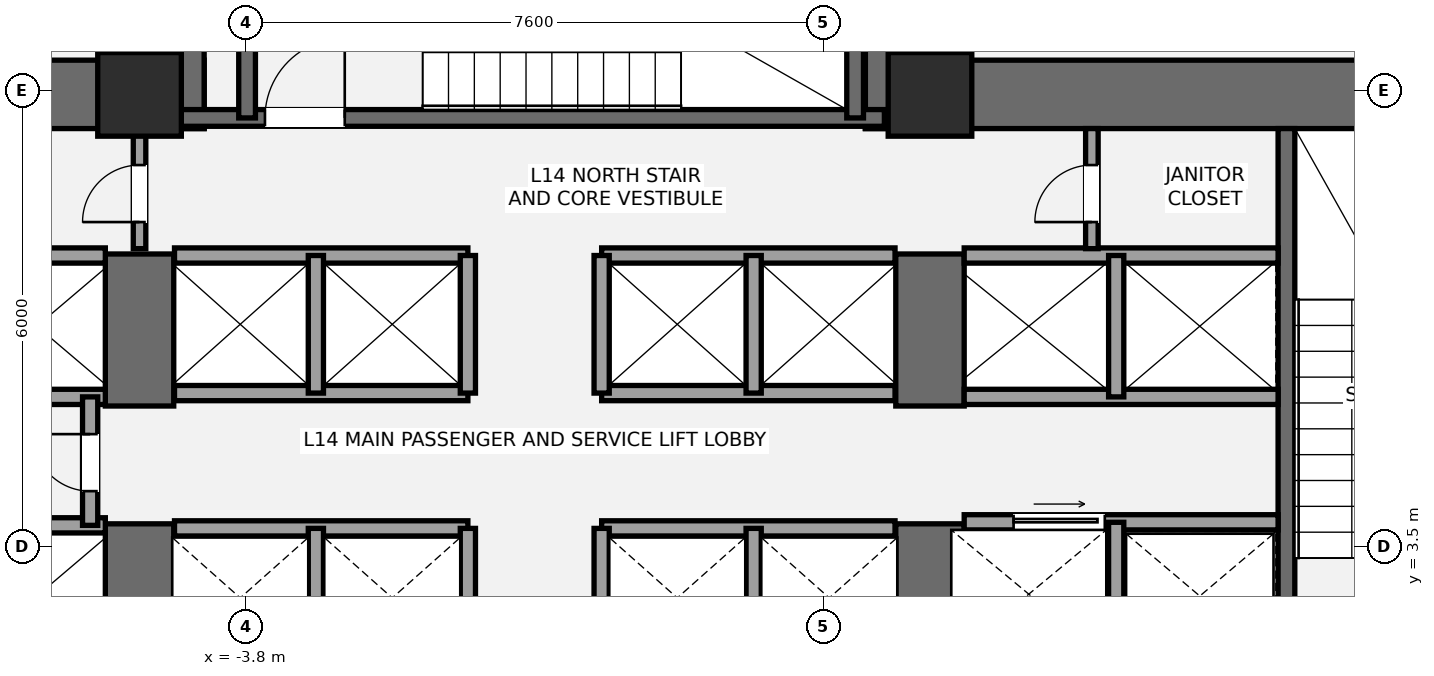
"""IFC4 building model, lengths in metres.
Left out: names, types, materials, properties, quantities, classifications, styles, units other than length and angle.
Written with IfcOpenShell. Run it as: python <this file> out.ifc"""

import sys

from ifc_helpers import new_model, si_unit, direction, frame, frame_2d, origin, origin_2d, place, context, subcontext, project, spatial, rectangle, extrude, element, fill, save


model = new_model("IFC4")
c1 = context("Model", 3, precision=1e-05, world=origin(), true_north=direction((0.0, 1.0)))
c2 = subcontext(c1, "Body", "Model", "MODEL_VIEW")
j1 = project(units=[si_unit("LENGTHUNIT", "METRE"), si_unit("PLANEANGLEUNIT", "RADIAN")], contexts=[c1])
p1 = place(None, origin())
s1 = spatial("IfcSite", under=j1, at=p1, CompositionType="ELEMENT")
p2 = place(p1, origin())
s2 = spatial("IfcBuilding", under=s1, at=p2, CompositionType="ELEMENT")
p3 = place(p2, frame((0.0, 0.0, 55.8)))
s3 = spatial("IfcBuildingStorey", under=s2, at=p3, CompositionType="ELEMENT", Elevation=55.8)
p4 = place(p3, frame((-14.05, 9.45, 0.0), z_axis=(0.0, 0.0, 1.0), x_axis=(1.0, 0.0, 0.0)))
e1 = element("IfcWall", 1, at=p4, inside=s3, PredefinedType="SHEAR", context=c2, shape_type="SweptSolid", body=[
    extrude(rectangle(XDim=9.7, YDim=0.9, at=frame_2d((4.85, 0.0))), origin(), (0.0, 0.0, 1.0), 3.6),
])
p5 = place(p3, frame((-5.2, 0.95, 0.0), z_axis=(0.0, 0.0, 1.0), x_axis=(0.0, 1.0, 0.0)))
e2 = element("IfcWall", 2, at=p5, inside=s3, PredefinedType="SHEAR", context=c2, shape_type="SweptSolid", body=[
    extrude(rectangle(XDim=2.85, YDim=0.9, at=frame_2d((1.425, 0.0))), origin(), (0.0, 0.0, 1.0), 3.6),
])
p6 = place(p3, frame((-5.2, 5.35, 0.0), z_axis=(0.0, 0.0, 1.0), x_axis=(0.0, 1.0, 0.0)))
e3 = element("IfcWall", 3, at=p6, inside=s3, PredefinedType="SHEAR", context=c2, shape_type="SweptSolid", body=[
    extrude(rectangle(XDim=2.0, YDim=0.9, at=frame_2d((1.0, 0.0))), origin(), (0.0, 0.0, 1.0), 3.6),
])
p7 = place(p3, frame((4.35, 9.45, 0.0), z_axis=(0.0, 0.0, 1.0), x_axis=(1.0, 0.0, 0.0)))
e4 = element("IfcWall", 4, at=p7, inside=s3, PredefinedType="SHEAR", context=c2, shape_type="SweptSolid", body=[
    extrude(rectangle(XDim=9.7, YDim=0.9, at=frame_2d((4.85, 0.0))), origin(), (0.0, 0.0, 1.0), 3.6),
])
p8 = place(p3, frame((5.2, 0.95, 0.0), z_axis=(0.0, 0.0, 1.0), x_axis=(0.0, 1.0, 0.0)))
e5 = element("IfcWall", 5, at=p8, inside=s3, PredefinedType="SHEAR", context=c2, shape_type="SweptSolid", body=[
    extrude(rectangle(XDim=2.85, YDim=0.9, at=frame_2d((1.425, 0.0))), origin(), (0.0, 0.0, 1.0), 3.6),
])
p9 = place(p3, frame((5.2, 5.35, 0.0), z_axis=(0.0, 0.0, 1.0), x_axis=(0.0, 1.0, 0.0)))
e6 = element("IfcWall", 6, at=p9, inside=s3, PredefinedType="SHEAR", context=c2, shape_type="SweptSolid", body=[
    extrude(rectangle(XDim=2.0, YDim=0.9, at=frame_2d((1.0, 0.0))), origin(), (0.0, 0.0, 1.0), 3.6),
])
p10 = place(p3, frame((9.89, 1.85, 0.0), z_axis=(0.0, 0.0, 1.0), x_axis=(0.0, 1.0, 0.0)))
e7 = element("IfcWall", 7, at=p10, inside=s3, PredefinedType="SHEAR", context=c2, shape_type="SweptSolid", body=[
    extrude(rectangle(XDim=7.15, YDim=0.22, at=frame_2d((3.575, 0.0))), origin(), (0.0, 0.0, 1.0), 3.6),
])
for number, where, z_axis, x_axis in (
    (8, (-4.8, 9.0, 0.0), (0.0, 0.0, 1.0), (0.0, 1.0, 0.0)),
    (9, (4.8, 9.0, 0.0), (0.0, 0.0, 1.0), (0.0, 1.0, 0.0)),
):
    element("IfcWall", number, at=place(p3, frame(where, z_axis=z_axis, x_axis=x_axis)), inside=s3, PredefinedType="SHEAR", context=c2, shape_type="SweptSolid", body=[
        extrude(rectangle(XDim=4.3, YDim=0.9, at=frame_2d((2.15, 0.0))), origin(), (0.0, 0.0, 1.0), 3.6),
    ])
p11 = place(p3, frame((-4.7, 9.14, 0.0), z_axis=(0.0, 0.0, 1.0), x_axis=(1.0, 0.0, 0.0)))
e10 = element("IfcWall", 10, at=p11, inside=s3, PredefinedType="SHEAR", context=c2, shape_type="SweptSolid", body=[
    extrude(rectangle(XDim=9.3, YDim=0.22, at=frame_2d((4.65, 0.0))), origin(), (0.0, 0.0, 1.0), 3.6),
])
p12 = place(p11, frame((1.15, 0.0, 0.0)))
e11 = element("IfcOpeningElement", 11, at=p12, cuts=e10, PredefinedType="OPENING", context=c2, shape_type="SweptSolid", body=[
    extrude(rectangle(XDim=1.05, YDim=2.15, at=frame_2d((0.525, 1.075))), frame((0.0, 0.12, 0.0), z_axis=(0.0, -1.0, 0.0), x_axis=(1.0, 0.0, 0.0)), (0.0, 0.0, 1.0), 0.24),
])
for number, where, z_axis, x_axis in (
    (12, (-3.785, 9.14, 0.0), (0.0, 0.0, 1.0), (0.0, 1.0, 0.0)),
    (13, (4.215, 9.14, 0.0), (0.0, 0.0, 1.0), (0.0, 1.0, 0.0)),
):
    element("IfcWall", number, at=place(p3, frame(where, z_axis=z_axis, x_axis=x_axis)), inside=s3, PredefinedType="SHEAR", context=c2, shape_type="SweptSolid", body=[
        extrude(rectangle(XDim=3.26, YDim=0.22, at=frame_2d((1.63, 0.0))), origin(), (0.0, 0.0, 1.0), 3.6),
    ])
for number, where, z_axis, x_axis in (
    (14, (-5.2, 9.45, 0.0), (0.0, 0.0, 1.0), (1.0, 0.0, 0.0)),
    (15, (5.2, 9.45, 0.0), (0.0, 0.0, 1.0), (1.0, 0.0, 0.0)),
):
    element("IfcColumn", number, at=place(p3, frame(where, z_axis=z_axis, x_axis=x_axis)), inside=s3, PredefinedType="COLUMN", context=c2, shape_type="SweptSolid", body=[
        extrude(rectangle(XDim=1.1, YDim=1.1, at=origin_2d()), origin(), (0.0, 0.0, 1.0), 3.6),
    ])
for number, where, z_axis, x_axis in (
    (16, (-9.78, 3.78, 0.0), (0.0, 0.0, 1.0), (1.0, 0.0, 0.0)),
    (17, (-9.78, 5.47, 0.0), (0.0, 0.0, 1.0), (1.0, 0.0, 0.0)),
    (18, (-9.78, 7.33, 0.0), (0.0, 0.0, 1.0), (1.0, 0.0, 0.0)),
):
    element("IfcWall", number, at=place(p3, frame(where, z_axis=z_axis, x_axis=x_axis)), inside=s3, PredefinedType="SOLIDWALL", context=c2, shape_type="SweptSolid", body=[
        extrude(rectangle(XDim=4.13, YDim=0.2, at=frame_2d((2.065, 0.0))), origin(), (0.0, 0.0, 1.0), 3.4),
    ])
p13 = place(p3, frame((-5.85, 3.78, 0.0), z_axis=(0.0, 0.0, 1.0), x_axis=(0.0, 1.0, 0.0)))
e19 = element("IfcWall", 19, at=p13, inside=s3, PredefinedType="SOLIDWALL", context=c2, shape_type="SweptSolid", body=[
    extrude(rectangle(XDim=1.69, YDim=0.2, at=frame_2d((0.845, 0.0))), origin(), (0.0, 0.0, 1.0), 3.4),
])
p14 = place(p13, frame((0.45, 0.0, 0.0)))
e20 = element("IfcOpeningElement", 20, at=p14, cuts=e19, PredefinedType="OPENING", context=c2, shape_type="SweptSolid", body=[
    extrude(rectangle(XDim=0.75, YDim=2.1, at=frame_2d((0.375, 1.05))), frame((0.0, 0.11, 0.0), z_axis=(0.0, -1.0, 0.0), x_axis=(1.0, 0.0, 0.0)), (0.0, 0.0, 1.0), 0.22),
])
p15 = place(p3, frame((5.65, 3.82, 0.0), z_axis=(0.0, 0.0, 1.0), x_axis=(1.0, 0.0, 0.0)))
e21 = element("IfcWall", 21, at=p15, inside=s3, PredefinedType="SOLIDWALL", context=c2, shape_type="SweptSolid", body=[
    extrude(rectangle(XDim=4.13, YDim=0.2, at=frame_2d((2.065, 0.0))), origin(), (0.0, 0.0, 1.0), 3.4),
])
p16 = place(p15, frame((0.65, 0.0, 0.0)))
e22 = element("IfcOpeningElement", 22, at=p16, cuts=e21, PredefinedType="OPENING", context=c2, shape_type="SweptSolid", body=[
    extrude(rectangle(XDim=1.2, YDim=2.2, at=frame_2d((0.6, 1.1))), frame((0.0, 0.11, 0.0), z_axis=(0.0, -1.0, 0.0), x_axis=(1.0, 0.0, 0.0)), (0.0, 0.0, 1.0), 0.22),
])
p17 = place(p3, frame((7.65, 1.85, 0.0), z_axis=(0.0, 0.0, 1.0), x_axis=(0.0, 1.0, 0.0)))
e23 = element("IfcWall", 23, at=p17, inside=s3, PredefinedType="SOLIDWALL", context=c2, shape_type="SweptSolid", body=[
    extrude(rectangle(XDim=1.97, YDim=0.2, at=frame_2d((0.985, 0.0))), origin(), (0.0, 0.0, 1.0), 3.4),
])
for number, where, z_axis, x_axis in (
    (24, (5.65, 5.47, 0.0), (0.0, 0.0, 1.0), (1.0, 0.0, 0.0)),
    (25, (5.65, 7.33, 0.0), (0.0, 0.0, 1.0), (1.0, 0.0, 0.0)),
):
    element("IfcWall", number, at=place(p3, frame(where, z_axis=z_axis, x_axis=x_axis)), inside=s3, PredefinedType="SOLIDWALL", context=c2, shape_type="SweptSolid", body=[
        extrude(rectangle(XDim=4.13, YDim=0.2, at=frame_2d((2.065, 0.0))), origin(), (0.0, 0.0, 1.0), 3.4),
    ])
p18 = place(p3, frame((7.65, 5.47, 0.0), z_axis=(0.0, 0.0, 1.0), x_axis=(0.0, 1.0, 0.0)))
e26 = element("IfcWall", 26, at=p18, inside=s3, PredefinedType="SOLIDWALL", context=c2, shape_type="SweptSolid", body=[
    extrude(rectangle(XDim=1.86, YDim=0.2, at=frame_2d((0.93, 0.0))), origin(), (0.0, 0.0, 1.0), 3.4),
])
for number, where, z_axis, x_axis in (
    (27, (-4.74, 3.74, 0.0), (0.0, 0.0, 1.0), (1.0, 0.0, 0.0)),
    (28, (0.88, 3.74, 0.0), (0.0, 0.0, 1.0), (1.0, 0.0, 0.0)),
):
    element("IfcWall", number, at=place(p3, frame(where, z_axis=z_axis, x_axis=x_axis)), inside=s3, PredefinedType="SOLIDWALL", context=c2, shape_type="SweptSolid", body=[
        extrude(rectangle(XDim=3.86, YDim=0.2, at=frame_2d((1.93, 0.0))), origin(), (0.0, 0.0, 1.0), 3.4),
    ])
for number, where, z_axis, x_axis in (
    (29, (-2.88, 1.92, 0.0), (0.0, 0.0, 1.0), (0.0, 1.0, 0.0)),
    (30, (2.88, 1.92, 0.0), (0.0, 0.0, 1.0), (0.0, 1.0, 0.0)),
    (31, (-0.88, 1.92, 0.0), (0.0, 0.0, 1.0), (0.0, 1.0, 0.0)),
    (32, (0.88, 1.92, 0.0), (0.0, 0.0, 1.0), (0.0, 1.0, 0.0)),
):
    element("IfcWall", number, at=place(p3, frame(where, z_axis=z_axis, x_axis=x_axis)), inside=s3, PredefinedType="SOLIDWALL", context=c2, shape_type="SweptSolid", body=[
        extrude(rectangle(XDim=1.82, YDim=0.2, at=frame_2d((0.91, 0.0))), origin(), (0.0, 0.0, 1.0), 3.4),
    ])
for number, where, z_axis, x_axis in (
    (33, (-4.74, 5.52, 0.0), (0.0, 0.0, 1.0), (1.0, 0.0, 0.0)),
    (34, (0.88, 5.52, 0.0), (0.0, 0.0, 1.0), (1.0, 0.0, 0.0)),
    (35, (-4.74, 7.33, 0.0), (0.0, 0.0, 1.0), (1.0, 0.0, 0.0)),
    (36, (0.88, 7.33, 0.0), (0.0, 0.0, 1.0), (1.0, 0.0, 0.0)),
):
    element("IfcWall", number, at=place(p3, frame(where, z_axis=z_axis, x_axis=x_axis)), inside=s3, PredefinedType="SOLIDWALL", context=c2, shape_type="SweptSolid", body=[
        extrude(rectangle(XDim=3.86, YDim=0.2, at=frame_2d((1.93, 0.0))), origin(), (0.0, 0.0, 1.0), 3.4),
    ])
for number, where, z_axis, x_axis in (
    (37, (-2.88, 5.52, 0.0), (0.0, 0.0, 1.0), (0.0, 1.0, 0.0)),
    (38, (2.88, 5.52, 0.0), (0.0, 0.0, 1.0), (0.0, 1.0, 0.0)),
    (39, (-0.88, 5.52, 0.0), (0.0, 0.0, 1.0), (0.0, 1.0, 0.0)),
    (40, (0.88, 5.52, 0.0), (0.0, 0.0, 1.0), (0.0, 1.0, 0.0)),
):
    element("IfcWall", number, at=place(p3, frame(where, z_axis=z_axis, x_axis=x_axis)), inside=s3, PredefinedType="SOLIDWALL", context=c2, shape_type="SweptSolid", body=[
        extrude(rectangle(XDim=1.81, YDim=0.2, at=frame_2d((0.905, 0.0))), origin(), (0.0, 0.0, 1.0), 3.4),
    ])
p19 = place(p3, frame((-5.2, 7.42, 0.0), z_axis=(0.0, 0.0, 1.0), x_axis=(0.0, 1.0, 0.0)))
e41 = element("IfcWall", 41, at=p19, inside=s3, PredefinedType="PARTITIONING", context=c2, shape_type="SweptSolid", body=[
    extrude(rectangle(XDim=1.58, YDim=0.165, at=frame_2d((0.79, 0.0))), origin(), (0.0, 0.0, 1.0), 3.4),
])
p20 = place(p19, frame((0.35, 0.0, 0.0)))
e42 = element("IfcOpeningElement", 42, at=p20, cuts=e41, PredefinedType="OPENING", context=c2, shape_type="SweptSolid", body=[
    extrude(rectangle(XDim=0.75, YDim=2.1, at=frame_2d((0.375, 1.05))), frame((0.0, 0.093, 0.0), z_axis=(0.0, -1.0, 0.0), x_axis=(1.0, 0.0, 0.0)), (0.0, 0.0, 1.0), 0.185),
])
p21 = place(p3, frame((7.33, 7.42, 0.0), z_axis=(0.0, 0.0, 1.0), x_axis=(0.0, 1.0, 0.0)))
e43 = element("IfcWall", 43, at=p21, inside=s3, PredefinedType="PARTITIONING", context=c2, shape_type="SweptSolid", body=[
    extrude(rectangle(XDim=1.58, YDim=0.165, at=frame_2d((0.79, 0.0))), origin(), (0.0, 0.0, 1.0), 3.4),
])
p22 = place(p21, frame((0.35, 0.0, 0.0)))
e44 = element("IfcOpeningElement", 44, at=p22, cuts=e43, PredefinedType="OPENING", context=c2, shape_type="SweptSolid", body=[
    extrude(rectangle(XDim=0.75, YDim=2.1, at=frame_2d((0.375, 1.05))), frame((0.0, 0.093, 0.0), z_axis=(0.0, -1.0, 0.0), x_axis=(1.0, 0.0, 0.0)), (0.0, 0.0, 1.0), 0.185),
])
p23 = place(p12, origin())
e45 = element("IfcDoor", 45, at=p23, inside=s3, OperationType="SINGLE_SWING_RIGHT", PredefinedType="DOOR", context=c2, shape_type="SweptSolid", body=[
    extrude(rectangle(XDim=1.05, YDim=2.15, at=frame_2d((0.525, 1.075))), frame((0.0, 0.025, 0.0), z_axis=(0.0, -1.0, 0.0), x_axis=(1.0, 0.0, 0.0)), (0.0, 0.0, 1.0), 0.05),
])
fill(e11, e45)
p24 = place(p14, origin())
e46 = element("IfcDoor", 46, at=p24, inside=s3, OperationType="SINGLE_SWING_RIGHT", PredefinedType="DOOR", context=c2, shape_type="SweptSolid", body=[
    extrude(rectangle(XDim=0.75, YDim=2.1, at=frame_2d((0.375, 1.05))), frame((0.0, 0.025, 0.0), z_axis=(0.0, -1.0, 0.0), x_axis=(1.0, 0.0, 0.0)), (0.0, 0.0, 1.0), 0.05),
])
fill(e20, e46)
p25 = place(p16, origin())
e47 = element("IfcDoor", 47, at=p25, inside=s3, OperationType="SLIDING_TO_RIGHT", PredefinedType="DOOR", context=c2, shape_type="SweptSolid", body=[
    extrude(rectangle(XDim=1.2, YDim=2.2, at=frame_2d((0.6, 1.1))), frame((0.0, 0.025, 0.0), z_axis=(0.0, -1.0, 0.0), x_axis=(1.0, 0.0, 0.0)), (0.0, 0.0, 1.0), 0.05),
])
fill(e22, e47)
p26 = place(p20, origin())
e48 = element("IfcDoor", 48, at=p26, inside=s3, OperationType="SINGLE_SWING_LEFT", PredefinedType="DOOR", context=c2, shape_type="SweptSolid", body=[
    extrude(rectangle(XDim=0.75, YDim=2.1, at=frame_2d((0.375, 1.05))), frame((0.0, 0.025, 0.0), z_axis=(0.0, -1.0, 0.0), x_axis=(1.0, 0.0, 0.0)), (0.0, 0.0, 1.0), 0.05),
])
fill(e42, e48)
p27 = place(p22, origin())
e49 = element("IfcDoor", 49, at=p27, inside=s3, OperationType="SINGLE_SWING_LEFT", PredefinedType="DOOR", context=c2, shape_type="SweptSolid", body=[
    extrude(rectangle(XDim=0.75, YDim=2.1, at=frame_2d((0.375, 1.05))), frame((0.0, 0.025, 0.0), z_axis=(0.0, -1.0, 0.0), x_axis=(1.0, 0.0, 0.0)), (0.0, 0.0, 1.0), 0.05),
])
fill(e44, e49)
save(model, sys.argv[1])
